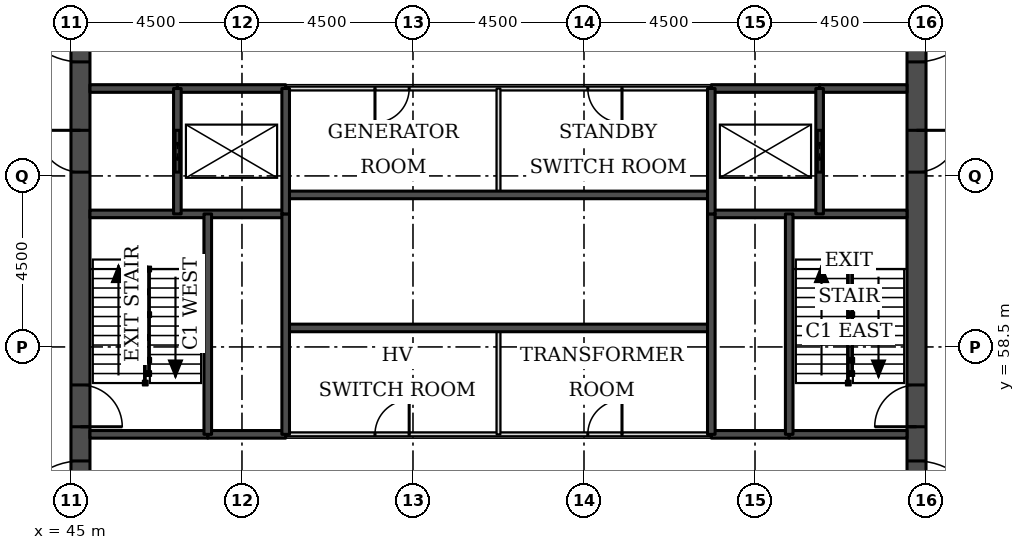
"""IFC4 building model, lengths in metres.
Left out: names, types, materials, properties, quantities, classifications, styles, units other than length and angle.
Written with IfcOpenShell. Run it as: python <this file> out.ifc"""

import sys

from ifc_helpers import new_model, si_unit, direction, frame, frame_2d, origin, place, context, subcontext, project, spatial, rectangle, extrude, element, fill, save


model = new_model("IFC4")
c1 = context("Model", 3, precision=1e-05, world=origin(), true_north=direction((0.0, 1.0)))
c2 = subcontext(c1, "Body", "Model", "MODEL_VIEW")
j1 = project(units=[si_unit("LENGTHUNIT", "METRE"), si_unit("PLANEANGLEUNIT", "RADIAN")], contexts=[c1])
p1 = place(None, origin())
s1 = spatial("IfcSite", under=j1, at=p1, CompositionType="ELEMENT")
p2 = place(p1, origin())
s2 = spatial("IfcBuilding", under=s1, at=p2, CompositionType="ELEMENT")
p3 = place(p2, frame((0.0, 0.0, -9.0)))
s3 = spatial("IfcBuildingStorey", under=s2, at=p3, CompositionType="ELEMENT", Elevation=-9.0)
p4 = place(p3, frame((45.25, 49.5, 0.0), z_axis=(0.0, 0.0, 1.0), x_axis=(0.0, 1.0, 0.0)))
e1 = element("IfcWall", 1, at=p4, inside=s3, PredefinedType="SHEAR", context=c2, shape_type="SweptSolid", body=[
    extrude(rectangle(XDim=22.5, YDim=0.5, at=frame_2d((11.25, 0.0))), origin(), (0.0, 0.0, 1.0), 4.5),
])
p5 = place(p4, frame((4.2, 0.0, 0.0)))
e2 = element("IfcOpeningElement", 2, at=p5, cuts=e1, PredefinedType="OPENING", context=c2, shape_type="SweptSolid", body=[
    extrude(rectangle(XDim=1.8, YDim=2.1, at=frame_2d((0.9, 1.05))), frame((0.0, 0.26, 0.0), z_axis=(0.0, -1.0, 0.0), x_axis=(1.0, 0.0, 0.0)), (0.0, 0.0, 1.0), 0.52),
])
p6 = place(p4, frame((6.9, 0.0, 0.0)))
e3 = element("IfcOpeningElement", 3, at=p6, cuts=e1, PredefinedType="OPENING", context=c2, shape_type="SweptSolid", body=[
    extrude(rectangle(XDim=1.1, YDim=2.1, at=frame_2d((0.55, 1.05))), frame((0.0, 0.26, 0.0), z_axis=(0.0, -1.0, 0.0), x_axis=(1.0, 0.0, 0.0)), (0.0, 0.0, 1.0), 0.52),
])
p7 = place(p4, frame((13.6, 0.0, 0.0)))
e4 = element("IfcOpeningElement", 4, at=p7, cuts=e1, PredefinedType="OPENING", context=c2, shape_type="SweptSolid", body=[
    extrude(rectangle(XDim=1.1, YDim=2.1, at=frame_2d((0.55, 1.05))), frame((0.0, 0.26, 0.0), z_axis=(0.0, -1.0, 0.0), x_axis=(1.0, 0.0, 0.0)), (0.0, 0.0, 1.0), 0.52),
])
p8 = place(p4, frame((16.5, 0.0, 0.0)))
e5 = element("IfcOpeningElement", 5, at=p8, cuts=e1, PredefinedType="OPENING", context=c2, shape_type="SweptSolid", body=[
    extrude(rectangle(XDim=1.8, YDim=2.1, at=frame_2d((0.9, 1.05))), frame((0.0, 0.26, 0.0), z_axis=(0.0, -1.0, 0.0), x_axis=(1.0, 0.0, 0.0)), (0.0, 0.0, 1.0), 0.52),
])
p9 = place(p3, frame((67.25, 49.5, 0.0), z_axis=(0.0, 0.0, 1.0), x_axis=(0.0, 1.0, 0.0)))
e6 = element("IfcWall", 6, at=p9, inside=s3, PredefinedType="SHEAR", context=c2, shape_type="SweptSolid", body=[
    extrude(rectangle(XDim=22.5, YDim=0.5, at=frame_2d((11.25, 0.0))), origin(), (0.0, 0.0, 1.0), 4.5),
])
p10 = place(p9, frame((4.2, 0.0, 0.0)))
e7 = element("IfcOpeningElement", 7, at=p10, cuts=e6, PredefinedType="OPENING", context=c2, shape_type="SweptSolid", body=[
    extrude(rectangle(XDim=1.8, YDim=2.1, at=frame_2d((0.9, 1.05))), frame((0.0, 0.26, 0.0), z_axis=(0.0, -1.0, 0.0), x_axis=(1.0, 0.0, 0.0)), (0.0, 0.0, 1.0), 0.52),
])
p11 = place(p9, frame((6.9, 0.0, 0.0)))
e8 = element("IfcOpeningElement", 8, at=p11, cuts=e6, PredefinedType="OPENING", context=c2, shape_type="SweptSolid", body=[
    extrude(rectangle(XDim=1.1, YDim=2.1, at=frame_2d((0.55, 1.05))), frame((0.0, 0.26, 0.0), z_axis=(0.0, -1.0, 0.0), x_axis=(1.0, 0.0, 0.0)), (0.0, 0.0, 1.0), 0.52),
])
p12 = place(p9, frame((13.6, 0.0, 0.0)))
e9 = element("IfcOpeningElement", 9, at=p12, cuts=e6, PredefinedType="OPENING", context=c2, shape_type="SweptSolid", body=[
    extrude(rectangle(XDim=1.1, YDim=2.1, at=frame_2d((0.55, 1.05))), frame((0.0, 0.26, 0.0), z_axis=(0.0, -1.0, 0.0), x_axis=(1.0, 0.0, 0.0)), (0.0, 0.0, 1.0), 0.52),
])
p13 = place(p9, frame((16.5, 0.0, 0.0)))
e10 = element("IfcOpeningElement", 10, at=p13, cuts=e6, PredefinedType="OPENING", context=c2, shape_type="SweptSolid", body=[
    extrude(rectangle(XDim=1.8, YDim=2.1, at=frame_2d((0.9, 1.05))), frame((0.0, 0.26, 0.0), z_axis=(0.0, -1.0, 0.0), x_axis=(1.0, 0.0, 0.0)), (0.0, 0.0, 1.0), 0.52),
])
p14 = place(p3, frame((50.65, 56.2, 0.0), z_axis=(0.0, 0.0, 1.0), x_axis=(1.0, 0.0, 0.0)))
e11 = element("IfcWall", 11, at=p14, inside=s3, PredefinedType="PARTITIONING", context=c2, shape_type="SweptSolid", body=[
    extrude(rectangle(XDim=11.2, YDim=0.1, at=frame_2d((5.6, 0.0))), origin(), (0.0, 0.0, 1.0), 4.1),
])
p15 = place(p14, frame((2.35, 0.0, 0.0)))
e12 = element("IfcOpeningElement", 12, at=p15, cuts=e11, PredefinedType="OPENING", context=c2, shape_type="SweptSolid", body=[
    extrude(rectangle(XDim=0.9, YDim=2.1, at=frame_2d((0.45, 1.05))), frame((0.0, 0.06, 0.0), z_axis=(0.0, -1.0, 0.0), x_axis=(1.0, 0.0, 0.0)), (0.0, 0.0, 1.0), 0.12),
])
p16 = place(p14, frame((7.95, 0.0, 0.0)))
e13 = element("IfcOpeningElement", 13, at=p16, cuts=e11, PredefinedType="OPENING", context=c2, shape_type="SweptSolid", body=[
    extrude(rectangle(XDim=0.9, YDim=2.1, at=frame_2d((0.45, 1.05))), frame((0.0, 0.06, 0.0), z_axis=(0.0, -1.0, 0.0), x_axis=(1.0, 0.0, 0.0)), (0.0, 0.0, 1.0), 0.12),
])
for number, where, z_axis, x_axis in (
    (14, (48.6, 56.2, 0.0), (0.0, 0.0, 1.0), (1.0, 0.0, 0.0)),
    (15, (61.85, 56.2, 0.0), (0.0, 0.0, 1.0), (1.0, 0.0, 0.0)),
):
    element("IfcWall", number, at=place(p3, frame(where, z_axis=z_axis, x_axis=x_axis)), inside=s3, PredefinedType="SOLIDWALL", context=c2, shape_type="SweptSolid", body=[
        extrude(rectangle(XDim=2.05, YDim=0.2, at=frame_2d((1.025, 0.0))), origin(), (0.0, 0.0, 1.0), 4.1),
    ])
for number, where, z_axis, x_axis in (
    (16, (45.5, 56.2, 0.0), (0.0, 0.0, 1.0), (1.0, 0.0, 0.0)),
    (17, (63.9, 56.2, 0.0), (0.0, 0.0, 1.0), (1.0, 0.0, 0.0)),
):
    element("IfcWall", number, at=place(p3, frame(where, z_axis=z_axis, x_axis=x_axis)), inside=s3, PredefinedType="SOLIDWALL", context=c2, shape_type="SweptSolid", body=[
        extrude(rectangle(XDim=3.1, YDim=0.2, at=frame_2d((1.55, 0.0))), origin(), (0.0, 0.0, 1.0), 4.1),
    ])
p17 = place(p3, frame((50.65, 59.0, 0.0), z_axis=(0.0, 0.0, 1.0), x_axis=(1.0, 0.0, 0.0)))
e18 = element("IfcWall", 18, at=p17, inside=s3, PredefinedType="SOLIDWALL", context=c2, shape_type="SweptSolid", body=[
    extrude(rectangle(XDim=11.2, YDim=0.2, at=frame_2d((5.6, 0.0))), origin(), (0.0, 0.0, 1.0), 4.1),
])
for number, where, z_axis, x_axis in (
    (19, (45.5, 62.0, 0.0), (0.0, 0.0, 1.0), (1.0, 0.0, 0.0)),
    (20, (61.85, 62.0, 0.0), (0.0, 0.0, 1.0), (1.0, 0.0, 0.0)),
):
    element("IfcWall", number, at=place(p3, frame(where, z_axis=z_axis, x_axis=x_axis)), inside=s3, PredefinedType="SOLIDWALL", context=c2, shape_type="SweptSolid", body=[
        extrude(rectangle(XDim=5.15, YDim=0.2, at=frame_2d((2.575, 0.0))), origin(), (0.0, 0.0, 1.0), 4.1),
    ])
p18 = place(p3, frame((50.65, 62.5, 0.0), z_axis=(0.0, 0.0, 1.0), x_axis=(1.0, 0.0, 0.0)))
e21 = element("IfcWall", 21, at=p18, inside=s3, PredefinedType="SOLIDWALL", context=c2, shape_type="SweptSolid", body=[
    extrude(rectangle(XDim=11.2, YDim=0.2, at=frame_2d((5.6, 0.0))), origin(), (0.0, 0.0, 1.0), 4.1),
])
p19 = place(p3, frame((50.65, 65.3, 0.0), z_axis=(0.0, 0.0, 1.0), x_axis=(1.0, 0.0, 0.0)))
e22 = element("IfcWall", 22, at=p19, inside=s3, PredefinedType="PARTITIONING", context=c2, shape_type="SweptSolid", body=[
    extrude(rectangle(XDim=11.2, YDim=0.1, at=frame_2d((5.6, 0.0))), origin(), (0.0, 0.0, 1.0), 4.1),
])
p20 = place(p19, frame((2.35, 0.0, 0.0)))
e23 = element("IfcOpeningElement", 23, at=p20, cuts=e22, PredefinedType="OPENING", context=c2, shape_type="SweptSolid", body=[
    extrude(rectangle(XDim=0.9, YDim=2.1, at=frame_2d((0.45, 1.05))), frame((0.0, 0.06, 0.0), z_axis=(0.0, -1.0, 0.0), x_axis=(1.0, 0.0, 0.0)), (0.0, 0.0, 1.0), 0.12),
])
p21 = place(p19, frame((7.95, 0.0, 0.0)))
e24 = element("IfcOpeningElement", 24, at=p21, cuts=e22, PredefinedType="OPENING", context=c2, shape_type="SweptSolid", body=[
    extrude(rectangle(XDim=0.9, YDim=2.1, at=frame_2d((0.45, 1.05))), frame((0.0, 0.06, 0.0), z_axis=(0.0, -1.0, 0.0), x_axis=(1.0, 0.0, 0.0)), (0.0, 0.0, 1.0), 0.12),
])
for number, where, z_axis, x_axis in (
    (25, (45.5, 65.3, 0.0), (0.0, 0.0, 1.0), (1.0, 0.0, 0.0)),
    (26, (64.7, 65.3, 0.0), (0.0, 0.0, 1.0), (1.0, 0.0, 0.0)),
):
    element("IfcWall", number, at=place(p3, frame(where, z_axis=z_axis, x_axis=x_axis)), inside=s3, PredefinedType="SOLIDWALL", context=c2, shape_type="SweptSolid", body=[
        extrude(rectangle(XDim=2.3, YDim=0.2, at=frame_2d((1.15, 0.0))), origin(), (0.0, 0.0, 1.0), 4.1),
    ])
for number, where, z_axis, x_axis in (
    (27, (47.8, 65.3, 0.0), (0.0, 0.0, 1.0), (1.0, 0.0, 0.0)),
    (28, (61.85, 65.3, 0.0), (0.0, 0.0, 1.0), (1.0, 0.0, 0.0)),
):
    element("IfcWall", number, at=place(p3, frame(where, z_axis=z_axis, x_axis=x_axis)), inside=s3, PredefinedType="SOLIDWALL", context=c2, shape_type="SweptSolid", body=[
        extrude(rectangle(XDim=2.85, YDim=0.2, at=frame_2d((1.425, 0.0))), origin(), (0.0, 0.0, 1.0), 4.1),
    ])
p22 = place(p3, frame((47.8, 62.0, 0.0), z_axis=(0.0, 0.0, 1.0), x_axis=(0.0, 1.0, 0.0)))
e29 = element("IfcWall", 29, at=p22, inside=s3, PredefinedType="SOLIDWALL", context=c2, shape_type="SweptSolid", body=[
    extrude(rectangle(XDim=3.3, YDim=0.2, at=frame_2d((1.65, 0.0))), origin(), (0.0, 0.0, 1.0), 4.1),
])
p23 = place(p22, frame((1.1, 0.0, 0.0)))
e30 = element("IfcOpeningElement", 30, at=p23, cuts=e29, PredefinedType="OPENING", context=c2, shape_type="SweptSolid", body=[
    extrude(rectangle(XDim=1.1, YDim=2.1, at=frame_2d((0.55, 1.05))), frame((0.0, 0.11, 0.0), z_axis=(0.0, -1.0, 0.0), x_axis=(1.0, 0.0, 0.0)), (0.0, 0.0, 1.0), 0.22),
])
for number, where, z_axis, x_axis in (
    (31, (48.6, 56.2, 0.0), (0.0, 0.0, 1.0), (0.0, 1.0, 0.0)),
    (32, (50.65, 56.2, 0.0), (0.0, 0.0, 1.0), (0.0, 1.0, 0.0)),
):
    element("IfcWall", number, at=place(p3, frame(where, z_axis=z_axis, x_axis=x_axis)), inside=s3, PredefinedType="SOLIDWALL", context=c2, shape_type="SweptSolid", body=[
        extrude(rectangle(XDim=5.8, YDim=0.2, at=frame_2d((2.9, 0.0))), origin(), (0.0, 0.0, 1.0), 4.1),
    ])
p24 = place(p3, frame((50.65, 62.0, 0.0), z_axis=(0.0, 0.0, 1.0), x_axis=(0.0, 1.0, 0.0)))
e33 = element("IfcWall", 33, at=p24, inside=s3, PredefinedType="SOLIDWALL", context=c2, shape_type="SweptSolid", body=[
    extrude(rectangle(XDim=3.3, YDim=0.2, at=frame_2d((1.65, 0.0))), origin(), (0.0, 0.0, 1.0), 4.1),
])
for number, where, z_axis, x_axis in (
    (34, (56.25, 56.2, 0.0), (0.0, 0.0, 1.0), (0.0, 1.0, 0.0)),
    (35, (56.25, 62.5, 0.0), (0.0, 0.0, 1.0), (0.0, 1.0, 0.0)),
):
    element("IfcWall", number, at=place(p3, frame(where, z_axis=z_axis, x_axis=x_axis)), inside=s3, PredefinedType="PARTITIONING", context=c2, shape_type="SweptSolid", body=[
        extrude(rectangle(XDim=2.8, YDim=0.1, at=frame_2d((1.4, 0.0))), origin(), (0.0, 0.0, 1.0), 4.1),
    ])
p25 = place(p3, frame((61.85, 56.2, 0.0), z_axis=(0.0, 0.0, 1.0), x_axis=(0.0, 1.0, 0.0)))
e36 = element("IfcWall", 36, at=p25, inside=s3, PredefinedType="SOLIDWALL", context=c2, shape_type="SweptSolid", body=[
    extrude(rectangle(XDim=5.8, YDim=0.2, at=frame_2d((2.9, 0.0))), origin(), (0.0, 0.0, 1.0), 4.1),
])
p26 = place(p3, frame((61.85, 62.0, 0.0), z_axis=(0.0, 0.0, 1.0), x_axis=(0.0, 1.0, 0.0)))
e37 = element("IfcWall", 37, at=p26, inside=s3, PredefinedType="SOLIDWALL", context=c2, shape_type="SweptSolid", body=[
    extrude(rectangle(XDim=3.3, YDim=0.2, at=frame_2d((1.65, 0.0))), origin(), (0.0, 0.0, 1.0), 4.1),
])
p27 = place(p3, frame((63.9, 56.2, 0.0), z_axis=(0.0, 0.0, 1.0), x_axis=(0.0, 1.0, 0.0)))
e38 = element("IfcWall", 38, at=p27, inside=s3, PredefinedType="SOLIDWALL", context=c2, shape_type="SweptSolid", body=[
    extrude(rectangle(XDim=5.8, YDim=0.2, at=frame_2d((2.9, 0.0))), origin(), (0.0, 0.0, 1.0), 4.1),
])
p28 = place(p3, frame((64.7, 62.0, 0.0), z_axis=(0.0, 0.0, 1.0), x_axis=(0.0, 1.0, 0.0)))
e39 = element("IfcWall", 39, at=p28, inside=s3, PredefinedType="SOLIDWALL", context=c2, shape_type="SweptSolid", body=[
    extrude(rectangle(XDim=3.3, YDim=0.2, at=frame_2d((1.65, 0.0))), origin(), (0.0, 0.0, 1.0), 4.1),
])
p29 = place(p28, frame((1.1, 0.0, 0.0)))
e40 = element("IfcOpeningElement", 40, at=p29, cuts=e39, PredefinedType="OPENING", context=c2, shape_type="SweptSolid", body=[
    extrude(rectangle(XDim=1.1, YDim=2.1, at=frame_2d((0.55, 1.05))), frame((0.0, 0.11, 0.0), z_axis=(0.0, -1.0, 0.0), x_axis=(1.0, 0.0, 0.0)), (0.0, 0.0, 1.0), 0.22),
])
p30 = place(p23, origin())
e41 = element("IfcDoor", 41, at=p30, inside=s3, OperationType="DOUBLE_DOOR_SLIDING", PredefinedType="DOOR", context=c2, shape_type="SweptSolid", body=[
    extrude(rectangle(XDim=1.1, YDim=2.1, at=frame_2d((0.55, 1.05))), frame((0.0, 0.025, 0.0), z_axis=(0.0, -1.0, 0.0), x_axis=(1.0, 0.0, 0.0)), (0.0, 0.0, 1.0), 0.05),
])
fill(e30, e41)
p31 = place(p29, origin())
e42 = element("IfcDoor", 42, at=p31, inside=s3, OperationType="DOUBLE_DOOR_SLIDING", PredefinedType="DOOR", context=c2, shape_type="SweptSolid", body=[
    extrude(rectangle(XDim=1.1, YDim=2.1, at=frame_2d((0.55, 1.05))), frame((0.0, 0.025, 0.0), z_axis=(0.0, -1.0, 0.0), x_axis=(1.0, 0.0, 0.0)), (0.0, 0.0, 1.0), 0.05),
])
fill(e40, e42)
p32 = place(p5, origin())
e43 = element("IfcDoor", 43, at=p32, inside=s3, OperationType="SINGLE_SWING_LEFT", PredefinedType="DOOR", context=c2, shape_type="SweptSolid", body=[
    extrude(rectangle(XDim=1.8, YDim=2.1, at=frame_2d((0.9, 1.05))), frame((0.0, 0.025, 0.0), z_axis=(0.0, -1.0, 0.0), x_axis=(1.0, 0.0, 0.0)), (0.0, 0.0, 1.0), 0.05),
])
fill(e2, e43)
p33 = place(p6, frame((1.1, 0.0, 0.0), z_axis=(0.0, 0.0, 1.0), x_axis=(-1.0, 0.0, 0.0)))
e44 = element("IfcDoor", 44, at=p33, inside=s3, OperationType="SINGLE_SWING_RIGHT", PredefinedType="DOOR", context=c2, shape_type="SweptSolid", body=[
    extrude(rectangle(XDim=1.1, YDim=2.1, at=frame_2d((0.55, 1.05))), frame((0.0, 0.025, 0.0), z_axis=(0.0, -1.0, 0.0), x_axis=(1.0, 0.0, 0.0)), (0.0, 0.0, 1.0), 0.05),
])
fill(e3, e44)
p34 = place(p7, origin())
e45 = element("IfcDoor", 45, at=p34, inside=s3, OperationType="SINGLE_SWING_RIGHT", PredefinedType="DOOR", context=c2, shape_type="SweptSolid", body=[
    extrude(rectangle(XDim=1.1, YDim=2.1, at=frame_2d((0.55, 1.05))), frame((0.0, 0.025, 0.0), z_axis=(0.0, -1.0, 0.0), x_axis=(1.0, 0.0, 0.0)), (0.0, 0.0, 1.0), 0.05),
])
fill(e4, e45)
p35 = place(p8, origin())
e46 = element("IfcDoor", 46, at=p35, inside=s3, OperationType="SINGLE_SWING_RIGHT", PredefinedType="DOOR", context=c2, shape_type="SweptSolid", body=[
    extrude(rectangle(XDim=1.8, YDim=2.1, at=frame_2d((0.9, 1.05))), frame((0.0, 0.025, 0.0), z_axis=(0.0, -1.0, 0.0), x_axis=(1.0, 0.0, 0.0)), (0.0, 0.0, 1.0), 0.05),
])
fill(e5, e46)
p36 = place(p10, frame((1.8, 0.0, 0.0), z_axis=(0.0, 0.0, 1.0), x_axis=(-1.0, 0.0, 0.0)))
e47 = element("IfcDoor", 47, at=p36, inside=s3, OperationType="SINGLE_SWING_RIGHT", PredefinedType="DOOR", context=c2, shape_type="SweptSolid", body=[
    extrude(rectangle(XDim=1.8, YDim=2.1, at=frame_2d((0.9, 1.05))), frame((0.0, 0.025, 0.0), z_axis=(0.0, -1.0, 0.0), x_axis=(1.0, 0.0, 0.0)), (0.0, 0.0, 1.0), 0.05),
])
fill(e7, e47)
p37 = place(p11, origin())
e48 = element("IfcDoor", 48, at=p37, inside=s3, OperationType="SINGLE_SWING_LEFT", PredefinedType="DOOR", context=c2, shape_type="SweptSolid", body=[
    extrude(rectangle(XDim=1.1, YDim=2.1, at=frame_2d((0.55, 1.05))), frame((0.0, 0.025, 0.0), z_axis=(0.0, -1.0, 0.0), x_axis=(1.0, 0.0, 0.0)), (0.0, 0.0, 1.0), 0.05),
])
fill(e8, e48)
p38 = place(p12, frame((1.1, 0.0, 0.0), z_axis=(0.0, 0.0, 1.0), x_axis=(-1.0, 0.0, 0.0)))
e49 = element("IfcDoor", 49, at=p38, inside=s3, OperationType="SINGLE_SWING_LEFT", PredefinedType="DOOR", context=c2, shape_type="SweptSolid", body=[
    extrude(rectangle(XDim=1.1, YDim=2.1, at=frame_2d((0.55, 1.05))), frame((0.0, 0.025, 0.0), z_axis=(0.0, -1.0, 0.0), x_axis=(1.0, 0.0, 0.0)), (0.0, 0.0, 1.0), 0.05),
])
fill(e9, e49)
p39 = place(p13, frame((1.8, 0.0, 0.0), z_axis=(0.0, 0.0, 1.0), x_axis=(-1.0, 0.0, 0.0)))
e50 = element("IfcDoor", 50, at=p39, inside=s3, OperationType="SINGLE_SWING_LEFT", PredefinedType="DOOR", context=c2, shape_type="SweptSolid", body=[
    extrude(rectangle(XDim=1.8, YDim=2.1, at=frame_2d((0.9, 1.05))), frame((0.0, 0.025, 0.0), z_axis=(0.0, -1.0, 0.0), x_axis=(1.0, 0.0, 0.0)), (0.0, 0.0, 1.0), 0.05),
])
fill(e10, e50)
p40 = place(p15, origin())
e51 = element("IfcDoor", 51, at=p40, inside=s3, OperationType="SINGLE_SWING_RIGHT", PredefinedType="DOOR", context=c2, shape_type="SweptSolid", body=[
    extrude(rectangle(XDim=0.9, YDim=2.1, at=frame_2d((0.45, 1.05))), frame((0.0, 0.025, 0.0), z_axis=(0.0, -1.0, 0.0), x_axis=(1.0, 0.0, 0.0)), (0.0, 0.0, 1.0), 0.05),
])
fill(e12, e51)
p41 = place(p16, origin())
e52 = element("IfcDoor", 52, at=p41, inside=s3, OperationType="SINGLE_SWING_RIGHT", PredefinedType="DOOR", context=c2, shape_type="SweptSolid", body=[
    extrude(rectangle(XDim=0.9, YDim=2.1, at=frame_2d((0.45, 1.05))), frame((0.0, 0.025, 0.0), z_axis=(0.0, -1.0, 0.0), x_axis=(1.0, 0.0, 0.0)), (0.0, 0.0, 1.0), 0.05),
])
fill(e13, e52)
p42 = place(p20, frame((0.9, 0.0, 0.0), z_axis=(0.0, 0.0, 1.0), x_axis=(-1.0, 0.0, 0.0)))
e53 = element("IfcDoor", 53, at=p42, inside=s3, OperationType="SINGLE_SWING_RIGHT", PredefinedType="DOOR", context=c2, shape_type="SweptSolid", body=[
    extrude(rectangle(XDim=0.9, YDim=2.1, at=frame_2d((0.45, 1.05))), frame((0.0, 0.025, 0.0), z_axis=(0.0, -1.0, 0.0), x_axis=(1.0, 0.0, 0.0)), (0.0, 0.0, 1.0), 0.05),
])
fill(e23, e53)
p43 = place(p21, frame((0.9, 0.0, 0.0), z_axis=(0.0, 0.0, 1.0), x_axis=(-1.0, 0.0, 0.0)))
e54 = element("IfcDoor", 54, at=p43, inside=s3, OperationType="SINGLE_SWING_LEFT", PredefinedType="DOOR", context=c2, shape_type="SweptSolid", body=[
    extrude(rectangle(XDim=0.9, YDim=2.1, at=frame_2d((0.45, 1.05))), frame((0.0, 0.025, 0.0), z_axis=(0.0, -1.0, 0.0), x_axis=(1.0, 0.0, 0.0)), (0.0, 0.0, 1.0), 0.05),
])
fill(e24, e54)
save(model, sys.argv[1])
